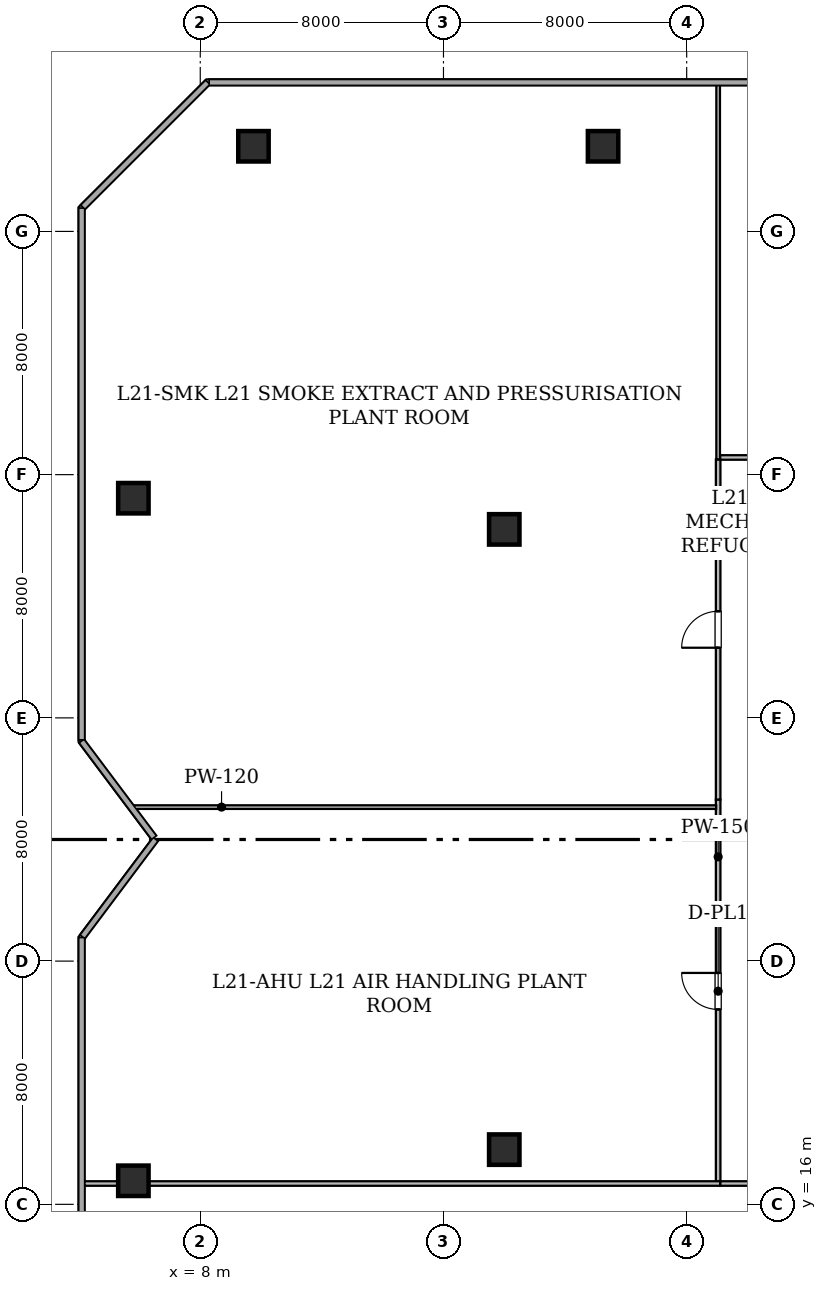
"""IFC4 building model, lengths in metres.
Left out: names, types, materials, properties, quantities, classifications, styles, units other than length and angle.
Written with IfcOpenShell. Run it as: python <this file> out.ifc"""

import sys

from ifc_helpers import new_model, si_unit, direction, frame, frame_2d, origin, origin_2d, place, context, subcontext, project, spatial, rectangle, hollow_rectangle, extrude, element, fill, save


model = new_model("IFC4")
c1 = context("Model", 3, precision=1e-05, world=origin(), true_north=direction((0.0, 1.0)))
c2 = subcontext(c1, "Body", "Model", "MODEL_VIEW")
j1 = project(units=[si_unit("LENGTHUNIT", "METRE"), si_unit("PLANEANGLEUNIT", "RADIAN")], contexts=[c1])
p1 = place(None, origin())
s1 = spatial("IfcSite", under=j1, at=p1, CompositionType="ELEMENT")
p2 = place(p1, origin())
s2 = spatial("IfcBuilding", under=s1, at=p2, CompositionType="ELEMENT")
p3 = place(p2, frame((0.0, 0.0, 84.4)))
s3 = spatial("IfcBuildingStorey", under=s2, at=p3, CompositionType="ELEMENT", Elevation=84.4)
for number, where, z_axis, x_axis in (
    (1, (9.75, 50.8, 0.0), (0.0, 0.0, 1.0), (1.0, 0.0, 0.0)),
    (2, (21.25, 50.8, 0.0), (0.0, 0.0, 1.0), (1.0, 0.0, 0.0)),
    (3, (5.8, 16.775, 0.0), (0.0, 0.0, 1.0), (1.0, 0.0, 0.0)),
    (4, (5.8, 39.225, 0.0), (0.0, 0.0, 1.0), (1.0, 0.0, 0.0)),
):
    element("IfcColumn", number, at=place(p3, frame(where, z_axis=z_axis, x_axis=x_axis)), inside=s3, PredefinedType="COLUMN", context=c2, shape_type="SweptSolid", body=[
        extrude(hollow_rectangle(XDim=1.0, YDim=1.0, WallThickness=0.05, at=origin_2d()), origin(), (0.0, 0.0, 1.0), 5.375),
    ])
for number, where, z_axis, x_axis in (
    (5, (18.0, 17.8, 0.0), (0.0, 0.0, 1.0), (1.0, 0.0, 0.0)),
    (6, (18.0, 38.2, 0.0), (0.0, 0.0, 1.0), (1.0, 0.0, 0.0)),
):
    element("IfcColumn", number, at=place(p3, frame(where, z_axis=z_axis, x_axis=x_axis)), inside=s3, PredefinedType="COLUMN", context=c2, shape_type="SweptSolid", body=[
        extrude(hollow_rectangle(XDim=1.0, YDim=1.0, WallThickness=0.05, at=origin_2d()), origin(), (0.0, 0.0, 1.0), 5.4),
    ])
p4 = place(p3, frame((4.1, 7.304, 0.0), z_axis=(0.0, 0.0, 1.0), x_axis=(0.0, 1.0, 0.0)))
e7 = element("IfcWall", 7, at=p4, inside=s3, PredefinedType="STANDARD", context=c2, shape_type="SweptSolid", body=[
    extrude(rectangle(XDim=17.463, YDim=0.2, at=frame_2d((8.731, 0.0))), origin(), (0.0, 0.0, 1.0), 1.15),
])
p5 = place(p3, frame((4.13, 24.807, 0.0), z_axis=(0.0, 0.0, 1.0), x_axis=(0.600029358831, 0.799977980035, 0.0)))
e8 = element("IfcWall", 8, at=p5, inside=s3, PredefinedType="STANDARD", context=c2, shape_type="SweptSolid", body=[
    extrude(rectangle(XDim=3.991, YDim=0.2, at=frame_2d((1.996, 0.0))), origin(), (0.0, 0.0, 1.0), 1.15),
])
p6 = place(p3, frame((6.473, 28.069, 0.0), z_axis=(0.0, 0.0, 1.0), x_axis=(-0.599990122557, 0.800007407987, 0.0)))
e9 = element("IfcWall", 9, at=p6, inside=s3, PredefinedType="STANDARD", context=c2, shape_type="SweptSolid", body=[
    extrude(rectangle(XDim=3.955, YDim=0.2, at=frame_2d((1.978, 0.0))), origin(), (0.0, 0.0, 1.0), 1.15),
])
p7 = place(p3, frame((4.1, 31.284, 0.0), z_axis=(0.0, 0.0, 1.0), x_axis=(0.0, 1.0, 0.0)))
e10 = element("IfcWall", 10, at=p7, inside=s3, PredefinedType="STANDARD", context=c2, shape_type="SweptSolid", body=[
    extrude(rectangle(XDim=17.475, YDim=0.2, at=frame_2d((8.738, 0.0))), origin(), (0.0, 0.0, 1.0), 1.15),
])
p8 = place(p3, frame((4.145, 48.804, 0.0), z_axis=(0.0, 0.0, 1.0), x_axis=(0.707106781187, 0.707106781187, 0.0)))
e11 = element("IfcWall", 11, at=p8, inside=s3, PredefinedType="STANDARD", context=c2, shape_type="SweptSolid", body=[
    extrude(rectangle(XDim=5.792, YDim=0.2, at=frame_2d((2.896, 0.0))), origin(), (0.0, 0.0, 1.0), 1.15),
])
p9 = place(p3, frame((8.302, 52.9, 0.0), z_axis=(0.0, 0.0, 1.0), x_axis=(1.0, 0.0, 0.0)))
e12 = element("IfcWall", 12, at=p9, inside=s3, PredefinedType="STANDARD", context=c2, shape_type="SweptSolid", body=[
    extrude(rectangle(XDim=37.457, YDim=0.2, at=frame_2d((18.729, 0.0))), origin(), (0.0, 0.0, 1.0), 1.15),
])
p10 = place(p3, frame((43.8, 16.685, 0.0), z_axis=(0.0, 0.0, 1.0), x_axis=(-1.0, 0.0, 0.0)))
e13 = element("IfcWall", 13, at=p10, inside=s3, PredefinedType="STANDARD", context=c2, shape_type="SweptSolid", body=[
    extrude(rectangle(XDim=18.7, YDim=0.15, at=frame_2d((9.35, 0.0))), origin(), (0.0, 0.0, 1.0), 3.42),
])
p11 = place(p10, frame((8.75, 0.0, 0.0)))
e14 = element("IfcOpeningElement", 14, at=p11, cuts=e13, PredefinedType="OPENING", context=c2, shape_type="SweptSolid", body=[
    extrude(rectangle(XDim=1.2, YDim=2.15, at=frame_2d((0.6, 1.075))), frame((0.0, 0.085, 0.0), z_axis=(0.0, -1.0, 0.0), x_axis=(1.0, 0.0, 0.0)), (0.0, 0.0, 1.0), 0.17),
])
p12 = place(p3, frame((25.035, 16.75, 0.0), z_axis=(0.0, 0.0, 1.0), x_axis=(0.0, 1.0, 0.0)))
e15 = element("IfcWall", 15, at=p12, inside=s3, PredefinedType="STANDARD", context=c2, shape_type="SweptSolid", body=[
    extrude(rectangle(XDim=12.564, YDim=0.15, at=frame_2d((6.282, 0.0))), origin(), (0.0, 0.0, 1.0), 3.42),
])
p13 = place(p12, frame((5.661, 0.0, 0.0)))
e16 = element("IfcOpeningElement", 16, at=p13, cuts=e15, PredefinedType="OPENING", context=c2, shape_type="SweptSolid", body=[
    extrude(rectangle(XDim=1.2, YDim=2.15, at=frame_2d((0.6, 1.075))), frame((0.0, 0.085, 0.0), z_axis=(0.0, -1.0, 0.0), x_axis=(1.0, 0.0, 0.0)), (0.0, 0.0, 1.0), 0.17),
])
p14 = place(p3, frame((25.035, 29.314, 0.0), z_axis=(0.0, 0.0, 1.0), x_axis=(0.0, 1.0, 0.0)))
e17 = element("IfcWall", 17, at=p14, inside=s3, PredefinedType="STANDARD", context=c2, shape_type="SweptSolid", body=[
    extrude(rectangle(XDim=11.186, YDim=0.15, at=frame_2d((5.593, 0.0))), origin(), (0.0, 0.0, 1.0), 3.42),
])
p15 = place(p14, frame((4.993, 0.0, 0.0)))
e18 = element("IfcOpeningElement", 18, at=p15, cuts=e17, PredefinedType="OPENING", context=c2, shape_type="SweptSolid", body=[
    extrude(rectangle(XDim=1.2, YDim=2.15, at=frame_2d((0.6, 1.075))), frame((0.0, 0.085, 0.0), z_axis=(0.0, -1.0, 0.0), x_axis=(1.0, 0.0, 0.0)), (0.0, 0.0, 1.0), 0.17),
])
p16 = place(p3, frame((25.1, 40.565, 0.0), z_axis=(0.0, 0.0, 1.0), x_axis=(1.0, 0.0, 0.0)))
e19 = element("IfcWall", 19, at=p16, inside=s3, PredefinedType="STANDARD", context=c2, shape_type="SweptSolid", body=[
    extrude(rectangle(XDim=18.7, YDim=0.15, at=frame_2d((9.35, 0.0))), origin(), (0.0, 0.0, 1.0), 3.42),
])
p17 = place(p16, frame((8.75, 0.0, 0.0)))
e20 = element("IfcOpeningElement", 20, at=p17, cuts=e19, PredefinedType="OPENING", context=c2, shape_type="SweptSolid", body=[
    extrude(rectangle(XDim=1.2, YDim=2.15, at=frame_2d((0.6, 1.075))), frame((0.0, 0.085, 0.0), z_axis=(0.0, -1.0, 0.0), x_axis=(1.0, 0.0, 0.0)), (0.0, 0.0, 1.0), 0.17),
])
p18 = place(p3, frame((4.192, 16.685, 0.0), z_axis=(0.0, 0.0, 1.0), x_axis=(1.0, 0.0, 0.0)))
e21 = element("IfcWall", 21, at=p18, inside=s3, PredefinedType="STANDARD", context=c2, shape_type="SweptSolid", body=[
    extrude(rectangle(XDim=20.908, YDim=0.15, at=frame_2d((10.454, 0.0))), origin(), (0.0, 0.0, 1.0), 3.42),
])
p19 = place(p3, frame((5.83, 29.065, 0.0), z_axis=(0.0, 0.0, 1.0), x_axis=(1.0, 0.0, 0.0)))
e22 = element("IfcWall", 22, at=p19, inside=s3, PredefinedType="PARTITIONING", context=c2, shape_type="SweptSolid", body=[
    extrude(rectangle(XDim=19.14, YDim=0.12, at=frame_2d((9.57, 0.0))), origin(), (0.0, 0.0, 1.0), 3.42),
])
p20 = place(p3, frame((25.035, 52.808, 0.0), z_axis=(0.0, 0.0, 1.0), x_axis=(0.0, -1.0, 0.0)))
e23 = element("IfcWall", 23, at=p20, inside=s3, PredefinedType="PARTITIONING", context=c2, shape_type="SweptSolid", body=[
    extrude(rectangle(XDim=12.308, YDim=0.12, at=frame_2d((6.154, 0.0))), origin(), (0.0, 0.0, 1.0), 3.42),
])
p21 = place(p13, origin())
e24 = element("IfcDoor", 24, at=p21, inside=s3, OperationType="SINGLE_SWING_RIGHT", PredefinedType="DOOR", context=c2, shape_type="SweptSolid", body=[
    extrude(rectangle(XDim=1.2, YDim=2.15, at=frame_2d((0.6, 1.075))), frame((0.0, 0.025, 0.0), z_axis=(0.0, -1.0, 0.0), x_axis=(1.0, 0.0, 0.0)), (0.0, 0.0, 1.0), 0.05),
])
fill(e16, e24)
p22 = place(p15, origin())
e25 = element("IfcDoor", 25, at=p22, inside=s3, OperationType="SINGLE_SWING_LEFT", PredefinedType="DOOR", context=c2, shape_type="SweptSolid", body=[
    extrude(rectangle(XDim=1.2, YDim=2.15, at=frame_2d((0.6, 1.075))), frame((0.0, 0.025, 0.0), z_axis=(0.0, -1.0, 0.0), x_axis=(1.0, 0.0, 0.0)), (0.0, 0.0, 1.0), 0.05),
])
fill(e18, e25)
save(model, sys.argv[1])
